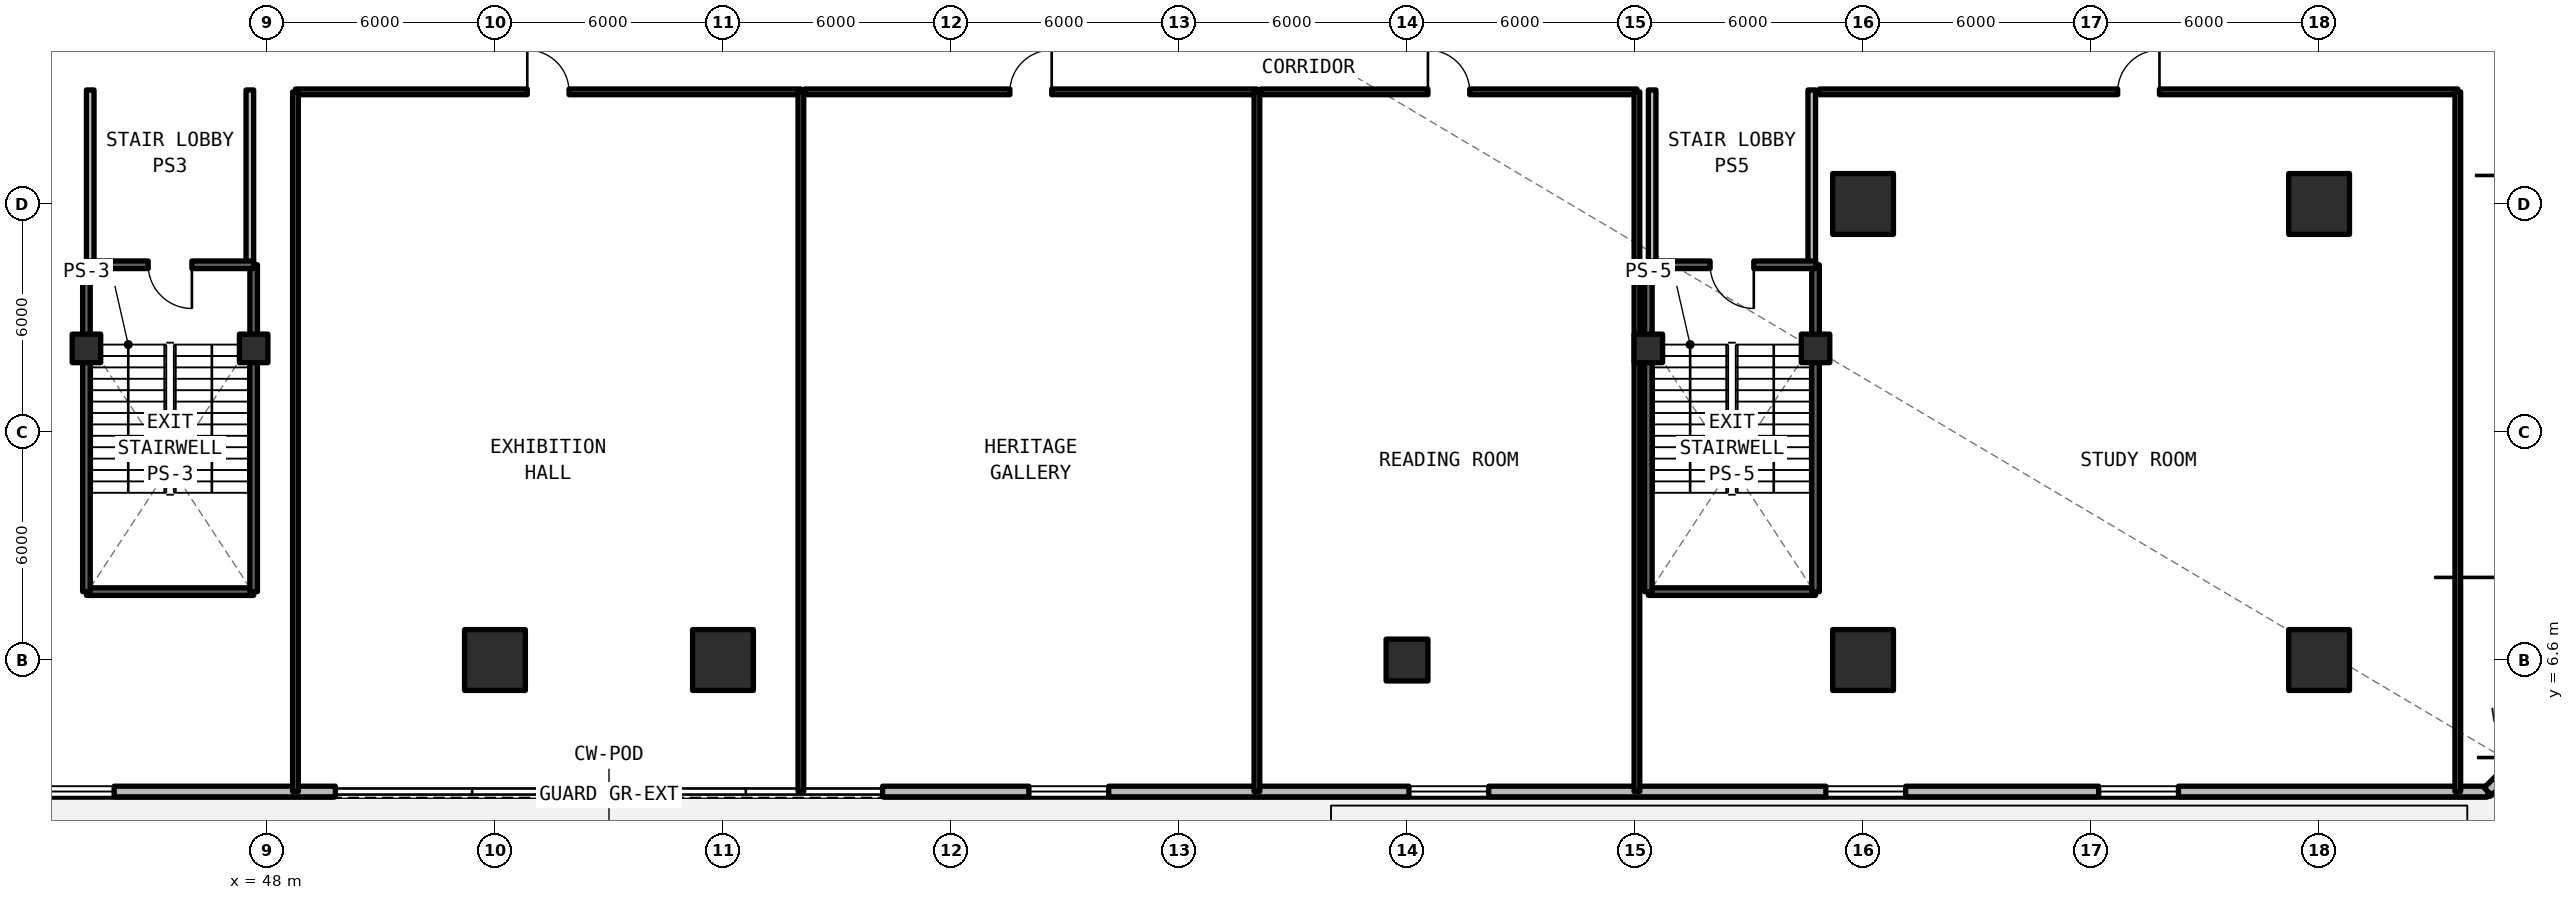
"""IFC4 building model, lengths in metres.
Left out: names, types, materials, properties, quantities, classifications, styles, units other than length and angle.
Written with IfcOpenShell. Run it as: python <this file> out.ifc"""

import sys

from ifc_helpers import new_model, si_unit, direction, frame, frame_2d, origin, origin_2d, place, context, subcontext, project, spatial, rectangle, circle, extrude, element, fill, save


model = new_model("IFC4")
c1 = context("Model", 3, precision=1e-05, world=origin(), true_north=direction((0.0, 1.0)))
c2 = subcontext(c1, "Body", "Model", "MODEL_VIEW")
j1 = project(units=[si_unit("LENGTHUNIT", "METRE"), si_unit("PLANEANGLEUNIT", "RADIAN")], contexts=[c1])
p1 = place(None, origin())
s1 = spatial("IfcSite", under=j1, at=p1, CompositionType="ELEMENT")
p2 = place(p1, origin())
s2 = spatial("IfcBuilding", under=s1, at=p2, CompositionType="ELEMENT")
p3 = place(p2, frame((0.0, 0.0, 14.85)))
s3 = spatial("IfcBuildingStorey", under=s2, at=p3, CompositionType="ELEMENT", Elevation=14.85)
for number, where, z_axis, x_axis in (
    (1, (54.0, 6.6, 0.0), (0.0, 0.0, 1.0), (1.0, 0.0, 0.0)),
    (2, (60.0, 6.6, 0.0), (0.0, 0.0, 1.0), (1.0, 0.0, 0.0)),
):
    element("IfcColumn", number, at=place(p3, frame(where, z_axis=z_axis, x_axis=x_axis)), inside=s3, PredefinedType="COLUMN", context=c2, shape_type="SweptSolid", body=[
        extrude(rectangle(XDim=1.6, YDim=1.6, at=origin_2d()), origin(), (0.0, 0.0, 1.0), 4.62),
    ])
p4 = place(p3, frame((78.0, 6.6, 0.0), z_axis=(0.0, 0.0, 1.0), x_axis=(1.0, 0.0, 0.0)))
e3 = element("IfcColumn", 3, at=p4, inside=s3, PredefinedType="COLUMN", context=c2, shape_type="SweptSolid", body=[
    extrude(circle(Radius=0.55, at=origin_2d()), origin(), (0.0, 0.0, 1.0), 4.62),
])
for number, where, z_axis, x_axis in (
    (4, (90.0, 6.6, 0.0), (0.0, 0.0, 1.0), (1.0, 0.0, 0.0)),
    (5, (102.0, 6.6, 0.0), (0.0, 0.0, 1.0), (1.0, 0.0, 0.0)),
    (6, (90.0, 18.6, 0.0), (0.0, 0.0, 1.0), (1.0, 0.0, 0.0)),
    (7, (102.0, 18.6, 0.0), (0.0, 0.0, 1.0), (1.0, 0.0, 0.0)),
):
    element("IfcColumn", number, at=place(p3, frame(where, z_axis=z_axis, x_axis=x_axis)), inside=s3, PredefinedType="COLUMN", context=c2, shape_type="SweptSolid", body=[
        extrude(rectangle(XDim=1.6, YDim=1.6, at=origin_2d()), origin(), (0.0, 0.0, 1.0), 4.62),
    ])
for number, where, z_axis, x_axis in (
    (8, (43.25, 14.8, 0.0), (0.0, 0.0, 1.0), (1.0, 0.0, 0.0)),
    (9, (47.65, 14.8, 0.0), (0.0, 0.0, 1.0), (1.0, 0.0, 0.0)),
    (10, (84.35, 14.8, 0.0), (0.0, 0.0, 1.0), (1.0, 0.0, 0.0)),
    (11, (88.75, 14.8, 0.0), (0.0, 0.0, 1.0), (1.0, 0.0, 0.0)),
):
    element("IfcColumn", number, at=place(p3, frame(where, z_axis=z_axis, x_axis=x_axis)), inside=s3, PredefinedType="COLUMN", context=c2, shape_type="SweptSolid", body=[
        extrude(rectangle(XDim=0.75, YDim=0.75, at=origin_2d()), origin(), (0.0, 0.0, 1.0), 4.62),
    ])
p5 = place(p3, frame((7.558, 3.14, 0.0), z_axis=(0.0, 0.0, 1.0), x_axis=(1.0, 0.0, 0.0)))
e12 = element("IfcWall", 12, at=p5, inside=s3, PredefinedType="SOLIDWALL", context=c2, shape_type="SweptSolid", body=[
    extrude(rectangle(XDim=42.242, YDim=0.28, at=frame_2d((21.121, 0.0))), origin(), (0.0, 0.0, 1.0), 4.34),
])
p6 = place(p5, frame((7.75, 0.0, 0.0)))
e13 = element("IfcOpeningElement", 13, at=p6, cuts=e12, PredefinedType="OPENING", context=c2, shape_type="SweptSolid", body=[
    extrude(rectangle(XDim=1.5, YDim=2.2, at=frame_2d((0.75, 1.1))), frame((0.0, 0.15, 0.0), z_axis=(0.0, -1.0, 0.0), x_axis=(1.0, 0.0, 0.0)), (0.0, 0.0, 1.0), 0.3),
])
p7 = place(p5, frame((28.092, 0.0, 0.78)))
e14 = element("IfcOpeningElement", 14, at=p7, cuts=e12, PredefinedType="OPENING", context=c2, shape_type="SweptSolid", body=[
    extrude(rectangle(XDim=2.1, YDim=1.66, at=frame_2d((1.05, 0.83))), frame((0.0, 0.15, 0.0), z_axis=(0.0, -1.0, 0.0), x_axis=(1.0, 0.0, 0.0)), (0.0, 0.0, 1.0), 0.3),
])
p8 = place(p5, frame((24.821, 0.0, 0.78)))
e15 = element("IfcOpeningElement", 15, at=p8, cuts=e12, PredefinedType="OPENING", context=c2, shape_type="SweptSolid", body=[
    extrude(rectangle(XDim=2.1, YDim=1.66, at=frame_2d((1.05, 0.83))), frame((0.0, 0.15, 0.0), z_axis=(0.0, -1.0, 0.0), x_axis=(1.0, 0.0, 0.0)), (0.0, 0.0, 1.0), 0.3),
])
p9 = place(p5, frame((34.321, 0.0, 0.78)))
e16 = element("IfcOpeningElement", 16, at=p9, cuts=e12, PredefinedType="OPENING", context=c2, shape_type="SweptSolid", body=[
    extrude(rectangle(XDim=2.1, YDim=1.66, at=frame_2d((1.05, 0.83))), frame((0.0, 0.15, 0.0), z_axis=(0.0, -1.0, 0.0), x_axis=(1.0, 0.0, 0.0)), (0.0, 0.0, 1.0), 0.3),
])
p10 = place(p3, frame((64.2, 3.14, 0.0), z_axis=(0.0, 0.0, 1.0), x_axis=(1.0, 0.0, 0.0)))
e17 = element("IfcWall", 17, at=p10, inside=s3, PredefinedType="SOLIDWALL", context=c2, shape_type="SweptSolid", body=[
    extrude(rectangle(XDim=42.242, YDim=0.28, at=frame_2d((21.121, 0.0))), origin(), (0.0, 0.0, 1.0), 4.34),
])
p11 = place(p10, frame((3.85, 0.0, 0.78)))
e18 = element("IfcOpeningElement", 18, at=p11, cuts=e17, PredefinedType="OPENING", context=c2, shape_type="SweptSolid", body=[
    extrude(rectangle(XDim=2.1, YDim=1.66, at=frame_2d((1.05, 0.83))), frame((0.0, 0.15, 0.0), z_axis=(0.0, -1.0, 0.0), x_axis=(1.0, 0.0, 0.0)), (0.0, 0.0, 1.0), 0.3),
])
p12 = place(p10, frame((13.85, 0.0, 0.78)))
e19 = element("IfcOpeningElement", 19, at=p12, cuts=e17, PredefinedType="OPENING", context=c2, shape_type="SweptSolid", body=[
    extrude(rectangle(XDim=2.1, YDim=1.66, at=frame_2d((1.05, 0.83))), frame((0.0, 0.15, 0.0), z_axis=(0.0, -1.0, 0.0), x_axis=(1.0, 0.0, 0.0)), (0.0, 0.0, 1.0), 0.3),
])
p13 = place(p10, frame((32.0, 0.0, 0.78)))
e20 = element("IfcOpeningElement", 20, at=p13, cuts=e17, PredefinedType="OPENING", context=c2, shape_type="SweptSolid", body=[
    extrude(rectangle(XDim=2.1, YDim=1.66, at=frame_2d((1.05, 0.83))), frame((0.0, 0.15, 0.0), z_axis=(0.0, -1.0, 0.0), x_axis=(1.0, 0.0, 0.0)), (0.0, 0.0, 1.0), 0.3),
])
p14 = place(p10, frame((24.821, 0.0, 0.78)))
e21 = element("IfcOpeningElement", 21, at=p14, cuts=e17, PredefinedType="OPENING", context=c2, shape_type="SweptSolid", body=[
    extrude(rectangle(XDim=2.1, YDim=1.66, at=frame_2d((1.05, 0.83))), frame((0.0, 0.15, 0.0), z_axis=(0.0, -1.0, 0.0), x_axis=(1.0, 0.0, 0.0)), (0.0, 0.0, 1.0), 0.3),
])
p15 = place(p3, frame((106.442, 3.14, 0.0), z_axis=(0.0, 0.0, 1.0), x_axis=(0.707106781187, 0.707106781187, 0.0)))
e22 = element("IfcWall", 22, at=p15, inside=s3, PredefinedType="SOLIDWALL", context=c2, shape_type="SweptSolid", body=[
    extrude(rectangle(XDim=2.854, YDim=0.28, at=frame_2d((1.427, 0.0))), origin(), (0.0, 0.0, 1.0), 4.34),
])
p16 = place(p15, frame((0.727, 0.0, 0.78)))
e23 = element("IfcOpeningElement", 23, at=p16, cuts=e22, PredefinedType="OPENING", context=c2, shape_type="SweptSolid", body=[
    extrude(rectangle(XDim=1.4, YDim=1.65, at=frame_2d((0.7, 0.825))), frame((0.0, 0.15, 0.0), z_axis=(0.0, -1.0, 0.0), x_axis=(1.0, 0.0, 0.0)), (0.0, 0.0, 1.0), 0.3),
])
for number, where, z_axis, x_axis in (
    (24, (43.35, 17.0, 0.0), (0.0, 0.0, 1.0), (0.0, 1.0, 0.0)),
    (25, (47.55, 17.0, 0.0), (0.0, 0.0, 1.0), (0.0, 1.0, 0.0)),
    (26, (84.45, 17.0, 0.0), (0.0, 0.0, 1.0), (0.0, 1.0, 0.0)),
    (27, (88.65, 17.0, 0.0), (0.0, 0.0, 1.0), (0.0, 1.0, 0.0)),
):
    element("IfcWall", number, at=place(p3, frame(where, z_axis=z_axis, x_axis=x_axis)), inside=s3, PredefinedType="SOLIDWALL", context=c2, shape_type="SweptSolid", body=[
        extrude(rectangle(XDim=4.6, YDim=0.2, at=frame_2d((2.3, 0.0))), origin(), (0.0, 0.0, 1.0), 3.56),
    ])
p17 = place(p3, frame((48.75, 21.55, 0.0), z_axis=(0.0, 0.0, 1.0), x_axis=(1.0, 0.0, 0.0)))
e28 = element("IfcWall", 28, at=p17, inside=s3, PredefinedType="SOLIDWALL", context=c2, shape_type="SweptSolid", body=[
    extrude(rectangle(XDim=13.3, YDim=0.15, at=frame_2d((6.65, 0.0))), origin(), (0.0, 0.0, 1.0), 3.56),
])
p18 = place(p17, frame((6.1, 0.0, 0.0)))
e29 = element("IfcOpeningElement", 29, at=p18, cuts=e28, PredefinedType="OPENING", context=c2, shape_type="SweptSolid", body=[
    extrude(rectangle(XDim=1.1, YDim=2.15, at=frame_2d((0.55, 1.075))), frame((0.0, 0.085, 0.0), z_axis=(0.0, -1.0, 0.0), x_axis=(1.0, 0.0, 0.0)), (0.0, 0.0, 1.0), 0.17),
])
for number, where, z_axis, x_axis in (
    (30, (48.75, 3.14, 0.0), (0.0, 0.0, 1.0), (0.0, 1.0, 0.0)),
    (31, (62.05, 3.14, 0.0), (0.0, 0.0, 1.0), (0.0, 1.0, 0.0)),
):
    element("IfcWall", number, at=place(p3, frame(where, z_axis=z_axis, x_axis=x_axis)), inside=s3, PredefinedType="SOLIDWALL", context=c2, shape_type="SweptSolid", body=[
        extrude(rectangle(XDim=18.41, YDim=0.15, at=frame_2d((9.205, 0.0))), origin(), (0.0, 0.0, 1.0), 3.56),
    ])
p19 = place(p3, frame((62.15, 21.55, 0.0), z_axis=(0.0, 0.0, 1.0), x_axis=(1.0, 0.0, 0.0)))
e32 = element("IfcWall", 32, at=p19, inside=s3, PredefinedType="SOLIDWALL", context=c2, shape_type="SweptSolid", body=[
    extrude(rectangle(XDim=11.9, YDim=0.15, at=frame_2d((5.95, 0.0))), origin(), (0.0, 0.0, 1.0), 3.56),
])
p20 = place(p19, frame((5.4, 0.0, 0.0)))
e33 = element("IfcOpeningElement", 33, at=p20, cuts=e32, PredefinedType="OPENING", context=c2, shape_type="SweptSolid", body=[
    extrude(rectangle(XDim=1.1, YDim=2.15, at=frame_2d((0.55, 1.075))), frame((0.0, 0.085, 0.0), z_axis=(0.0, -1.0, 0.0), x_axis=(1.0, 0.0, 0.0)), (0.0, 0.0, 1.0), 0.17),
])
p21 = place(p3, frame((74.05, 3.14, 0.0), z_axis=(0.0, 0.0, 1.0), x_axis=(0.0, 1.0, 0.0)))
e34 = element("IfcWall", 34, at=p21, inside=s3, PredefinedType="SOLIDWALL", context=c2, shape_type="SweptSolid", body=[
    extrude(rectangle(XDim=18.41, YDim=0.15, at=frame_2d((9.205, 0.0))), origin(), (0.0, 0.0, 1.0), 3.56),
])
p22 = place(p3, frame((74.15, 21.55, 0.0), z_axis=(0.0, 0.0, 1.0), x_axis=(1.0, 0.0, 0.0)))
e35 = element("IfcWall", 35, at=p22, inside=s3, PredefinedType="SOLIDWALL", context=c2, shape_type="SweptSolid", body=[
    extrude(rectangle(XDim=9.9, YDim=0.15, at=frame_2d((4.95, 0.0))), origin(), (0.0, 0.0, 1.0), 3.56),
])
p23 = place(p22, frame((4.4, 0.0, 0.0)))
e36 = element("IfcOpeningElement", 36, at=p23, cuts=e35, PredefinedType="OPENING", context=c2, shape_type="SweptSolid", body=[
    extrude(rectangle(XDim=1.1, YDim=2.15, at=frame_2d((0.55, 1.075))), frame((0.0, 0.085, 0.0), z_axis=(0.0, -1.0, 0.0), x_axis=(1.0, 0.0, 0.0)), (0.0, 0.0, 1.0), 0.17),
])
p24 = place(p3, frame((84.05, 3.14, 0.0), z_axis=(0.0, 0.0, 1.0), x_axis=(0.0, 1.0, 0.0)))
e37 = element("IfcWall", 37, at=p24, inside=s3, PredefinedType="SOLIDWALL", context=c2, shape_type="SweptSolid", body=[
    extrude(rectangle(XDim=18.41, YDim=0.15, at=frame_2d((9.205, 0.0))), origin(), (0.0, 0.0, 1.0), 3.56),
])
p25 = place(p3, frame((88.85, 21.55, 0.0), z_axis=(0.0, 0.0, 1.0), x_axis=(1.0, 0.0, 0.0)))
e38 = element("IfcWall", 38, at=p25, inside=s3, PredefinedType="SOLIDWALL", context=c2, shape_type="SweptSolid", body=[
    extrude(rectangle(XDim=16.8, YDim=0.15, at=frame_2d((8.4, 0.0))), origin(), (0.0, 0.0, 1.0), 3.56),
])
p26 = place(p25, frame((7.85, 0.0, 0.0)))
e39 = element("IfcOpeningElement", 39, at=p26, cuts=e38, PredefinedType="OPENING", context=c2, shape_type="SweptSolid", body=[
    extrude(rectangle(XDim=1.1, YDim=2.15, at=frame_2d((0.55, 1.075))), frame((0.0, 0.085, 0.0), z_axis=(0.0, -1.0, 0.0), x_axis=(1.0, 0.0, 0.0)), (0.0, 0.0, 1.0), 0.17),
])
p27 = place(p3, frame((105.65, 3.14, 0.0), z_axis=(0.0, 0.0, 1.0), x_axis=(0.0, 1.0, 0.0)))
e40 = element("IfcWall", 40, at=p27, inside=s3, PredefinedType="SOLIDWALL", context=c2, shape_type="SweptSolid", body=[
    extrude(rectangle(XDim=18.41, YDim=0.15, at=frame_2d((9.205, 0.0))), origin(), (0.0, 0.0, 1.0), 3.56),
])
p28 = place(p3, frame((43.25, 8.4, 0.0), z_axis=(0.0, 0.0, 1.0), x_axis=(1.0, 0.0, 0.0)))
e41 = element("IfcWall", 41, at=p28, inside=s3, PredefinedType="SOLIDWALL", context=c2, shape_type="SweptSolid", body=[
    extrude(rectangle(XDim=4.4, YDim=0.2, at=frame_2d((2.2, 0.0))), origin(), (0.0, 0.0, 1.0), 4.62),
])
p29 = place(p3, frame((47.65, 8.4, 0.0), z_axis=(0.0, 0.0, 1.0), x_axis=(0.0, 1.0, 0.0)))
e42 = element("IfcWall", 42, at=p29, inside=s3, PredefinedType="SOLIDWALL", context=c2, shape_type="SweptSolid", body=[
    extrude(rectangle(XDim=8.6, YDim=0.2, at=frame_2d((4.3, 0.0))), origin(), (0.0, 0.0, 1.0), 4.62),
])
p30 = place(p3, frame((47.65, 17.0, 0.0), z_axis=(0.0, 0.0, 1.0), x_axis=(-1.0, 0.0, 0.0)))
e43 = element("IfcWall", 43, at=p30, inside=s3, PredefinedType="SOLIDWALL", context=c2, shape_type="SweptSolid", body=[
    extrude(rectangle(XDim=4.4, YDim=0.2, at=frame_2d((2.2, 0.0))), origin(), (0.0, 0.0, 1.0), 4.62),
])
p31 = place(p30, frame((1.625, 0.0, 0.0)))
e44 = element("IfcOpeningElement", 44, at=p31, cuts=e43, PredefinedType="OPENING", context=c2, shape_type="SweptSolid", body=[
    extrude(rectangle(XDim=1.15, YDim=2.15, at=frame_2d((0.575, 1.075))), frame((0.0, 0.11, 0.0), z_axis=(0.0, -1.0, 0.0), x_axis=(1.0, 0.0, 0.0)), (0.0, 0.0, 1.0), 0.22),
])
p32 = place(p3, frame((43.25, 17.0, 0.0), z_axis=(0.0, 0.0, 1.0), x_axis=(0.0, -1.0, 0.0)))
e45 = element("IfcWall", 45, at=p32, inside=s3, PredefinedType="SOLIDWALL", context=c2, shape_type="SweptSolid", body=[
    extrude(rectangle(XDim=8.6, YDim=0.2, at=frame_2d((4.3, 0.0))), origin(), (0.0, 0.0, 1.0), 4.62),
])
p33 = place(p3, frame((84.35, 8.4, 0.0), z_axis=(0.0, 0.0, 1.0), x_axis=(1.0, 0.0, 0.0)))
e46 = element("IfcWall", 46, at=p33, inside=s3, PredefinedType="SOLIDWALL", context=c2, shape_type="SweptSolid", body=[
    extrude(rectangle(XDim=4.4, YDim=0.2, at=frame_2d((2.2, 0.0))), origin(), (0.0, 0.0, 1.0), 4.62),
])
p34 = place(p3, frame((88.75, 8.4, 0.0), z_axis=(0.0, 0.0, 1.0), x_axis=(0.0, 1.0, 0.0)))
e47 = element("IfcWall", 47, at=p34, inside=s3, PredefinedType="SOLIDWALL", context=c2, shape_type="SweptSolid", body=[
    extrude(rectangle(XDim=8.6, YDim=0.2, at=frame_2d((4.3, 0.0))), origin(), (0.0, 0.0, 1.0), 4.62),
])
p35 = place(p3, frame((88.75, 17.0, 0.0), z_axis=(0.0, 0.0, 1.0), x_axis=(-1.0, 0.0, 0.0)))
e48 = element("IfcWall", 48, at=p35, inside=s3, PredefinedType="SOLIDWALL", context=c2, shape_type="SweptSolid", body=[
    extrude(rectangle(XDim=4.4, YDim=0.2, at=frame_2d((2.2, 0.0))), origin(), (0.0, 0.0, 1.0), 4.62),
])
p36 = place(p35, frame((1.625, 0.0, 0.0)))
e49 = element("IfcOpeningElement", 49, at=p36, cuts=e48, PredefinedType="OPENING", context=c2, shape_type="SweptSolid", body=[
    extrude(rectangle(XDim=1.15, YDim=2.15, at=frame_2d((0.575, 1.075))), frame((0.0, 0.11, 0.0), z_axis=(0.0, -1.0, 0.0), x_axis=(1.0, 0.0, 0.0)), (0.0, 0.0, 1.0), 0.22),
])
p37 = place(p3, frame((84.35, 17.0, 0.0), z_axis=(0.0, 0.0, 1.0), x_axis=(0.0, -1.0, 0.0)))
e50 = element("IfcWall", 50, at=p37, inside=s3, PredefinedType="SOLIDWALL", context=c2, shape_type="SweptSolid", body=[
    extrude(rectangle(XDim=8.6, YDim=0.2, at=frame_2d((4.3, 0.0))), origin(), (0.0, 0.0, 1.0), 4.62),
])
p38 = place(p9, origin())
e51 = element("IfcWindow", 51, at=p38, inside=s3, PartitioningType="SINGLE_PANEL", PredefinedType="WINDOW", context=c2, shape_type="SweptSolid", body=[
    extrude(rectangle(XDim=2.1, YDim=1.66, at=frame_2d((1.05, 0.83))), frame((0.0, 0.03, 0.0), z_axis=(0.0, -1.0, 0.0), x_axis=(1.0, 0.0, 0.0)), (0.0, 0.0, 1.0), 0.06),
])
fill(e16, e51)
p39 = place(p11, origin())
e52 = element("IfcWindow", 52, at=p39, inside=s3, PartitioningType="SINGLE_PANEL", PredefinedType="WINDOW", context=c2, shape_type="SweptSolid", body=[
    extrude(rectangle(XDim=2.1, YDim=1.66, at=frame_2d((1.05, 0.83))), frame((0.0, 0.03, 0.0), z_axis=(0.0, -1.0, 0.0), x_axis=(1.0, 0.0, 0.0)), (0.0, 0.0, 1.0), 0.06),
])
fill(e18, e52)
p40 = place(p12, origin())
e53 = element("IfcWindow", 53, at=p40, inside=s3, PartitioningType="SINGLE_PANEL", PredefinedType="WINDOW", context=c2, shape_type="SweptSolid", body=[
    extrude(rectangle(XDim=2.1, YDim=1.66, at=frame_2d((1.05, 0.83))), frame((0.0, 0.03, 0.0), z_axis=(0.0, -1.0, 0.0), x_axis=(1.0, 0.0, 0.0)), (0.0, 0.0, 1.0), 0.06),
])
fill(e19, e53)
p41 = place(p13, origin())
e54 = element("IfcWindow", 54, at=p41, inside=s3, PartitioningType="SINGLE_PANEL", PredefinedType="WINDOW", context=c2, shape_type="SweptSolid", body=[
    extrude(rectangle(XDim=2.1, YDim=1.66, at=frame_2d((1.05, 0.83))), frame((0.0, 0.03, 0.0), z_axis=(0.0, -1.0, 0.0), x_axis=(1.0, 0.0, 0.0)), (0.0, 0.0, 1.0), 0.06),
])
fill(e20, e54)
p42 = place(p14, origin())
e55 = element("IfcWindow", 55, at=p42, inside=s3, PartitioningType="SINGLE_PANEL", PredefinedType="WINDOW", context=c2, shape_type="SweptSolid", body=[
    extrude(rectangle(XDim=2.1, YDim=1.66, at=frame_2d((1.05, 0.83))), frame((0.0, 0.03, 0.0), z_axis=(0.0, -1.0, 0.0), x_axis=(1.0, 0.0, 0.0)), (0.0, 0.0, 1.0), 0.06),
])
fill(e21, e55)
p43 = place(p18, origin())
e56 = element("IfcDoor", 56, at=p43, inside=s3, OperationType="SINGLE_SWING_LEFT", PredefinedType="DOOR", context=c2, shape_type="SweptSolid", body=[
    extrude(rectangle(XDim=1.1, YDim=2.15, at=frame_2d((0.55, 1.075))), frame((0.0, 0.025, 0.0), z_axis=(0.0, -1.0, 0.0), x_axis=(1.0, 0.0, 0.0)), (0.0, 0.0, 1.0), 0.05),
])
fill(e29, e56)
p44 = place(p20, origin())
e57 = element("IfcDoor", 57, at=p44, inside=s3, OperationType="SINGLE_SWING_RIGHT", PredefinedType="DOOR", context=c2, shape_type="SweptSolid", body=[
    extrude(rectangle(XDim=1.1, YDim=2.15, at=frame_2d((0.55, 1.075))), frame((0.0, 0.025, 0.0), z_axis=(0.0, -1.0, 0.0), x_axis=(1.0, 0.0, 0.0)), (0.0, 0.0, 1.0), 0.05),
])
fill(e33, e57)
p45 = place(p23, origin())
e58 = element("IfcDoor", 58, at=p45, inside=s3, OperationType="SINGLE_SWING_LEFT", PredefinedType="DOOR", context=c2, shape_type="SweptSolid", body=[
    extrude(rectangle(XDim=1.1, YDim=2.15, at=frame_2d((0.55, 1.075))), frame((0.0, 0.025, 0.0), z_axis=(0.0, -1.0, 0.0), x_axis=(1.0, 0.0, 0.0)), (0.0, 0.0, 1.0), 0.05),
])
fill(e36, e58)
p46 = place(p26, origin())
e59 = element("IfcDoor", 59, at=p46, inside=s3, OperationType="SINGLE_SWING_RIGHT", PredefinedType="DOOR", context=c2, shape_type="SweptSolid", body=[
    extrude(rectangle(XDim=1.1, YDim=2.15, at=frame_2d((0.55, 1.075))), frame((0.0, 0.025, 0.0), z_axis=(0.0, -1.0, 0.0), x_axis=(1.0, 0.0, 0.0)), (0.0, 0.0, 1.0), 0.05),
])
fill(e39, e59)
p47 = place(p31, origin())
e60 = element("IfcDoor", 60, at=p47, inside=s3, OperationType="SINGLE_SWING_RIGHT", PredefinedType="DOOR", context=c2, shape_type="SweptSolid", body=[
    extrude(rectangle(XDim=1.15, YDim=2.15, at=frame_2d((0.575, 1.075))), frame((0.0, 0.025, 0.0), z_axis=(0.0, -1.0, 0.0), x_axis=(1.0, 0.0, 0.0)), (0.0, 0.0, 1.0), 0.05),
])
fill(e44, e60)
p48 = place(p36, origin())
e61 = element("IfcDoor", 61, at=p48, inside=s3, OperationType="SINGLE_SWING_RIGHT", PredefinedType="DOOR", context=c2, shape_type="SweptSolid", body=[
    extrude(rectangle(XDim=1.15, YDim=2.15, at=frame_2d((0.575, 1.075))), frame((0.0, 0.025, 0.0), z_axis=(0.0, -1.0, 0.0), x_axis=(1.0, 0.0, 0.0)), (0.0, 0.0, 1.0), 0.05),
])
fill(e49, e61)
save(model, sys.argv[1])
